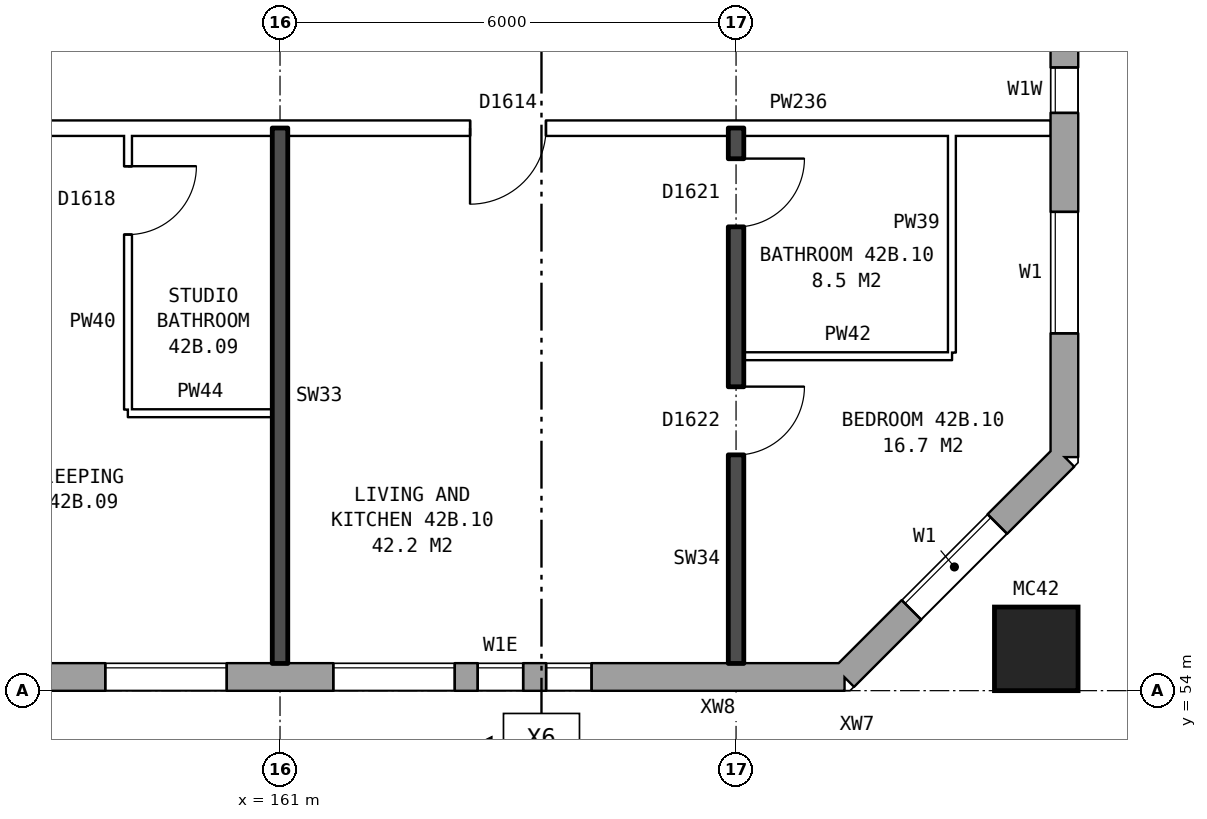
"""IFC4 building model, lengths in metres.
Left out: names, types, materials, properties, quantities, classifications, styles, units other than length and angle.
Written with IfcOpenShell. Run it as: python <this file> out.ifc"""

import sys

from ifc_helpers import new_model, si_unit, direction, frame, frame_2d, origin, origin_2d, place, context, subcontext, project, spatial, rectangle, hollow_rectangle, extrude, element, fill, save


model = new_model("IFC4")
c1 = context("Model", 3, precision=1e-05, world=origin(), true_north=direction((0.0, 1.0)))
c2 = subcontext(c1, "Body", "Model", "MODEL_VIEW")
j1 = project(units=[si_unit("LENGTHUNIT", "METRE"), si_unit("PLANEANGLEUNIT", "RADIAN")], contexts=[c1])
p1 = place(None, origin())
s1 = spatial("IfcSite", under=j1, at=p1, CompositionType="ELEMENT")
p2 = place(p1, origin())
s2 = spatial("IfcBuilding", under=s1, at=p2, CompositionType="ELEMENT")
p3 = place(p2, frame((0.0, 0.0, 151.6)))
s3 = spatial("IfcBuildingStorey", under=s2, at=p3, CompositionType="ELEMENT", Elevation=151.6)
p4 = place(p3, frame((170.95, 54.55, 0.0), z_axis=(0.0, 0.0, 1.0), x_axis=(1.0, 0.0, 0.0)))
e1 = element("IfcColumn", 1, at=p4, inside=s3, PredefinedType="COLUMN", context=c2, shape_type="SweptSolid", body=[
    extrude(hollow_rectangle(XDim=1.1, YDim=1.1, WallThickness=0.06, at=origin_2d()), origin(), (0.0, 0.0, 1.0), 3.1),
])
p5 = place(p3, frame((134.075, 54.18, 0.0), z_axis=(0.0, 0.0, 1.0), x_axis=(1.0, 0.0, 0.0)))
e2 = element("IfcWall", 2, at=p5, inside=s3, PredefinedType="STANDARD", context=c2, shape_type="SweptSolid", body=[
    extrude(rectangle(XDim=34.351, YDim=0.36, at=frame_2d((17.175, 0.0))), origin(), (0.0, 0.0, 1.0), 2.85),
])
p6 = place(p5, frame((0.3, 0.0, 0.8)))
e3 = element("IfcOpeningElement", 3, at=p6, cuts=e2, PredefinedType="OPENING", context=c2, shape_type="SweptSolid", body=[
    extrude(rectangle(XDim=0.8, YDim=1.8, at=frame_2d((0.4, 0.9))), frame((0.0, 0.19, 0.0), z_axis=(0.0, -1.0, 0.0), x_axis=(1.0, 0.0, 0.0)), (0.0, 0.0, 1.0), 0.38),
])
p7 = place(p5, frame((3.575, 0.0, 0.8)))
e4 = element("IfcOpeningElement", 4, at=p7, cuts=e2, PredefinedType="OPENING", context=c2, shape_type="SweptSolid", body=[
    extrude(rectangle(XDim=1.0, YDim=1.2, at=frame_2d((0.5, 0.6))), frame((0.0, 0.19, 0.0), z_axis=(0.0, -1.0, 0.0), x_axis=(1.0, 0.0, 0.0)), (0.0, 0.0, 1.0), 0.38),
])
p8 = place(p5, frame((6.625, 0.0, 0.8)))
e5 = element("IfcOpeningElement", 5, at=p8, cuts=e2, PredefinedType="OPENING", context=c2, shape_type="SweptSolid", body=[
    extrude(rectangle(XDim=1.6, YDim=1.8, at=frame_2d((0.8, 0.9))), frame((0.0, 0.19, 0.0), z_axis=(0.0, -1.0, 0.0), x_axis=(1.0, 0.0, 0.0)), (0.0, 0.0, 1.0), 0.38),
])
p9 = place(p5, frame((9.625, 0.0, 0.8)))
e6 = element("IfcOpeningElement", 6, at=p9, cuts=e2, PredefinedType="OPENING", context=c2, shape_type="SweptSolid", body=[
    extrude(rectangle(XDim=1.6, YDim=1.8, at=frame_2d((0.8, 0.9))), frame((0.0, 0.19, 0.0), z_axis=(0.0, -1.0, 0.0), x_axis=(1.0, 0.0, 0.0)), (0.0, 0.0, 1.0), 0.38),
])
p10 = place(p5, frame((12.625, 0.0, 0.8)))
e7 = element("IfcOpeningElement", 7, at=p10, cuts=e2, PredefinedType="OPENING", context=c2, shape_type="SweptSolid", body=[
    extrude(rectangle(XDim=1.6, YDim=1.8, at=frame_2d((0.8, 0.9))), frame((0.0, 0.19, 0.0), z_axis=(0.0, -1.0, 0.0), x_axis=(1.0, 0.0, 0.0)), (0.0, 0.0, 1.0), 0.38),
])
p11 = place(p5, frame((15.625, 0.0, 0.8)))
e8 = element("IfcOpeningElement", 8, at=p11, cuts=e2, PredefinedType="OPENING", context=c2, shape_type="SweptSolid", body=[
    extrude(rectangle(XDim=1.6, YDim=1.8, at=frame_2d((0.8, 0.9))), frame((0.0, 0.19, 0.0), z_axis=(0.0, -1.0, 0.0), x_axis=(1.0, 0.0, 0.0)), (0.0, 0.0, 1.0), 0.38),
])
p12 = place(p5, frame((18.625, 0.0, 0.8)))
e9 = element("IfcOpeningElement", 9, at=p12, cuts=e2, PredefinedType="OPENING", context=c2, shape_type="SweptSolid", body=[
    extrude(rectangle(XDim=1.6, YDim=1.8, at=frame_2d((0.8, 0.9))), frame((0.0, 0.19, 0.0), z_axis=(0.0, -1.0, 0.0), x_axis=(1.0, 0.0, 0.0)), (0.0, 0.0, 1.0), 0.38),
])
p13 = place(p5, frame((21.625, 0.0, 0.8)))
e10 = element("IfcOpeningElement", 10, at=p13, cuts=e2, PredefinedType="OPENING", context=c2, shape_type="SweptSolid", body=[
    extrude(rectangle(XDim=1.6, YDim=1.8, at=frame_2d((0.8, 0.9))), frame((0.0, 0.19, 0.0), z_axis=(0.0, -1.0, 0.0), x_axis=(1.0, 0.0, 0.0)), (0.0, 0.0, 1.0), 0.38),
])
p14 = place(p5, frame((24.625, 0.0, 0.8)))
e11 = element("IfcOpeningElement", 11, at=p14, cuts=e2, PredefinedType="OPENING", context=c2, shape_type="SweptSolid", body=[
    extrude(rectangle(XDim=1.6, YDim=1.8, at=frame_2d((0.8, 0.9))), frame((0.0, 0.19, 0.0), z_axis=(0.0, -1.0, 0.0), x_axis=(1.0, 0.0, 0.0)), (0.0, 0.0, 1.0), 0.38),
])
p15 = place(p5, frame((27.625, 0.0, 0.8)))
e12 = element("IfcOpeningElement", 12, at=p15, cuts=e2, PredefinedType="OPENING", context=c2, shape_type="SweptSolid", body=[
    extrude(rectangle(XDim=1.6, YDim=1.8, at=frame_2d((0.8, 0.9))), frame((0.0, 0.19, 0.0), z_axis=(0.0, -1.0, 0.0), x_axis=(1.0, 0.0, 0.0)), (0.0, 0.0, 1.0), 0.38),
])
p16 = place(p5, frame((29.525, 0.0, 0.8)))
e13 = element("IfcOpeningElement", 13, at=p16, cuts=e2, PredefinedType="OPENING", context=c2, shape_type="SweptSolid", body=[
    extrude(rectangle(XDim=0.6, YDim=1.8, at=frame_2d((0.3, 0.9))), frame((0.0, 0.19, 0.0), z_axis=(0.0, -1.0, 0.0), x_axis=(1.0, 0.0, 0.0)), (0.0, 0.0, 1.0), 0.38),
])
p17 = place(p5, frame((1.4, 0.0, 1.6)))
e14 = element("IfcOpeningElement", 14, at=p17, cuts=e2, PredefinedType="OPENING", context=c2, shape_type="SweptSolid", body=[
    extrude(rectangle(XDim=0.6, YDim=0.9, at=frame_2d((0.3, 0.45))), frame((0.0, 0.19, 0.0), z_axis=(0.0, -1.0, 0.0), x_axis=(1.0, 0.0, 0.0)), (0.0, 0.0, 1.0), 0.38),
])
p18 = place(p5, frame((4.875, 0.0, 0.8)))
e15 = element("IfcOpeningElement", 15, at=p18, cuts=e2, PredefinedType="OPENING", context=c2, shape_type="SweptSolid", body=[
    extrude(rectangle(XDim=1.4, YDim=1.8, at=frame_2d((0.7, 0.9))), frame((0.0, 0.19, 0.0), z_axis=(0.0, -1.0, 0.0), x_axis=(1.0, 0.0, 0.0)), (0.0, 0.0, 1.0), 0.38),
])
p19 = place(p5, frame((30.425, 0.0, 0.8)))
e16 = element("IfcOpeningElement", 16, at=p19, cuts=e2, PredefinedType="OPENING", context=c2, shape_type="SweptSolid", body=[
    extrude(rectangle(XDim=0.6, YDim=0.9, at=frame_2d((0.3, 0.45))), frame((0.0, 0.19, 0.0), z_axis=(0.0, -1.0, 0.0), x_axis=(1.0, 0.0, 0.0)), (0.0, 0.0, 1.0), 0.38),
])
p20 = place(p3, frame((168.425, 54.18, 0.0), z_axis=(0.0, 0.0, 1.0), x_axis=(0.707106781187, 0.707106781187, 0.0)))
e17 = element("IfcWall", 17, at=p20, inside=s3, PredefinedType="STANDARD", context=c2, shape_type="SweptSolid", body=[
    extrude(rectangle(XDim=4.094, YDim=0.36, at=frame_2d((2.047, 0.0))), origin(), (0.0, 0.0, 1.0), 2.85),
])
p21 = place(p20, frame((1.247, 0.0, 0.8)))
e18 = element("IfcOpeningElement", 18, at=p21, cuts=e17, PredefinedType="OPENING", context=c2, shape_type="SweptSolid", body=[
    extrude(rectangle(XDim=1.6, YDim=1.8, at=frame_2d((0.8, 0.9))), frame((0.0, 0.19, 0.0), z_axis=(0.0, -1.0, 0.0), x_axis=(1.0, 0.0, 0.0)), (0.0, 0.0, 1.0), 0.38),
])
p22 = place(p3, frame((171.32, 57.075, 0.0), z_axis=(0.0, 0.0, 1.0), x_axis=(0.0, 1.0, 0.0)))
e19 = element("IfcWall", 19, at=p22, inside=s3, PredefinedType="STANDARD", context=c2, shape_type="SweptSolid", body=[
    extrude(rectangle(XDim=25.851, YDim=0.36, at=frame_2d((12.925, 0.0))), origin(), (0.0, 0.0, 1.0), 2.85),
])
p23 = place(p22, frame((1.625, 0.0, 0.8)))
e20 = element("IfcOpeningElement", 20, at=p23, cuts=e19, PredefinedType="OPENING", context=c2, shape_type="SweptSolid", body=[
    extrude(rectangle(XDim=1.6, YDim=1.8, at=frame_2d((0.8, 0.9))), frame((0.0, 0.19, 0.0), z_axis=(0.0, -1.0, 0.0), x_axis=(1.0, 0.0, 0.0)), (0.0, 0.0, 1.0), 0.38),
])
p24 = place(p22, frame((4.525, 0.0, 1.7)))
e21 = element("IfcOpeningElement", 21, at=p24, cuts=e19, PredefinedType="OPENING", context=c2, shape_type="SweptSolid", body=[
    extrude(rectangle(XDim=0.6, YDim=0.9, at=frame_2d((0.3, 0.45))), frame((0.0, 0.19, 0.0), z_axis=(0.0, -1.0, 0.0), x_axis=(1.0, 0.0, 0.0)), (0.0, 0.0, 1.0), 0.38),
])
p25 = place(p22, frame((7.625, 0.0, 0.8)))
e22 = element("IfcOpeningElement", 22, at=p25, cuts=e19, PredefinedType="OPENING", context=c2, shape_type="SweptSolid", body=[
    extrude(rectangle(XDim=1.6, YDim=1.8, at=frame_2d((0.8, 0.9))), frame((0.0, 0.19, 0.0), z_axis=(0.0, -1.0, 0.0), x_axis=(1.0, 0.0, 0.0)), (0.0, 0.0, 1.0), 0.38),
])
p26 = place(p22, frame((10.625, 0.0, 0.8)))
e23 = element("IfcOpeningElement", 23, at=p26, cuts=e19, PredefinedType="OPENING", context=c2, shape_type="SweptSolid", body=[
    extrude(rectangle(XDim=1.6, YDim=1.8, at=frame_2d((0.8, 0.9))), frame((0.0, 0.19, 0.0), z_axis=(0.0, -1.0, 0.0), x_axis=(1.0, 0.0, 0.0)), (0.0, 0.0, 1.0), 0.38),
])
p27 = place(p22, frame((13.625, 0.0, 0.8)))
e24 = element("IfcOpeningElement", 24, at=p27, cuts=e19, PredefinedType="OPENING", context=c2, shape_type="SweptSolid", body=[
    extrude(rectangle(XDim=1.6, YDim=1.8, at=frame_2d((0.8, 0.9))), frame((0.0, 0.19, 0.0), z_axis=(0.0, -1.0, 0.0), x_axis=(1.0, 0.0, 0.0)), (0.0, 0.0, 1.0), 0.38),
])
p28 = place(p22, frame((16.625, 0.0, 0.8)))
e25 = element("IfcOpeningElement", 25, at=p28, cuts=e19, PredefinedType="OPENING", context=c2, shape_type="SweptSolid", body=[
    extrude(rectangle(XDim=1.6, YDim=1.8, at=frame_2d((0.8, 0.9))), frame((0.0, 0.19, 0.0), z_axis=(0.0, -1.0, 0.0), x_axis=(1.0, 0.0, 0.0)), (0.0, 0.0, 1.0), 0.38),
])
p29 = place(p22, frame((6.125, 0.0, 0.8)))
e26 = element("IfcOpeningElement", 26, at=p29, cuts=e19, PredefinedType="OPENING", context=c2, shape_type="SweptSolid", body=[
    extrude(rectangle(XDim=1.2, YDim=0.9, at=frame_2d((0.6, 0.45))), frame((0.0, 0.19, 0.0), z_axis=(0.0, -1.0, 0.0), x_axis=(1.0, 0.0, 0.0)), (0.0, 0.0, 1.0), 0.38),
])
p30 = place(p22, frame((22.625, 0.0, 0.8)))
e27 = element("IfcOpeningElement", 27, at=p30, cuts=e19, PredefinedType="OPENING", context=c2, shape_type="SweptSolid", body=[
    extrude(rectangle(XDim=1.6, YDim=1.8, at=frame_2d((0.8, 0.9))), frame((0.0, 0.19, 0.0), z_axis=(0.0, -1.0, 0.0), x_axis=(1.0, 0.0, 0.0)), (0.0, 0.0, 1.0), 0.38),
])
p31 = place(p22, frame((9.525, 0.0, 0.8)))
e28 = element("IfcOpeningElement", 28, at=p31, cuts=e19, PredefinedType="OPENING", context=c2, shape_type="SweptSolid", body=[
    extrude(rectangle(XDim=0.8, YDim=1.8, at=frame_2d((0.4, 0.9))), frame((0.0, 0.19, 0.0), z_axis=(0.0, -1.0, 0.0), x_axis=(1.0, 0.0, 0.0)), (0.0, 0.0, 1.0), 0.38),
])
p32 = place(p22, frame((12.525, 0.0, 0.8)))
e29 = element("IfcOpeningElement", 29, at=p32, cuts=e19, PredefinedType="OPENING", context=c2, shape_type="SweptSolid", body=[
    extrude(rectangle(XDim=0.8, YDim=1.8, at=frame_2d((0.4, 0.9))), frame((0.0, 0.19, 0.0), z_axis=(0.0, -1.0, 0.0), x_axis=(1.0, 0.0, 0.0)), (0.0, 0.0, 1.0), 0.38),
])
p33 = place(p22, frame((15.525, 0.0, 0.8)))
e30 = element("IfcOpeningElement", 30, at=p33, cuts=e19, PredefinedType="OPENING", context=c2, shape_type="SweptSolid", body=[
    extrude(rectangle(XDim=0.8, YDim=1.8, at=frame_2d((0.4, 0.9))), frame((0.0, 0.19, 0.0), z_axis=(0.0, -1.0, 0.0), x_axis=(1.0, 0.0, 0.0)), (0.0, 0.0, 1.0), 0.38),
])
p34 = place(p22, frame((18.525, 0.0, 0.8)))
e31 = element("IfcOpeningElement", 31, at=p34, cuts=e19, PredefinedType="OPENING", context=c2, shape_type="SweptSolid", body=[
    extrude(rectangle(XDim=1.0, YDim=0.9, at=frame_2d((0.5, 0.45))), frame((0.0, 0.19, 0.0), z_axis=(0.0, -1.0, 0.0), x_axis=(1.0, 0.0, 0.0)), (0.0, 0.0, 1.0), 0.38),
])
p35 = place(p22, frame((20.725, 0.0, 1.7)))
e32 = element("IfcOpeningElement", 32, at=p35, cuts=e19, PredefinedType="OPENING", context=c2, shape_type="SweptSolid", body=[
    extrude(rectangle(XDim=0.6, YDim=0.9, at=frame_2d((0.3, 0.45))), frame((0.0, 0.19, 0.0), z_axis=(0.0, -1.0, 0.0), x_axis=(1.0, 0.0, 0.0)), (0.0, 0.0, 1.0), 0.38),
])
p36 = place(p3, frame((159.0, 57.65, 0.0), z_axis=(0.0, 0.0, 1.0), x_axis=(1.0, 0.0, 0.0)))
e33 = element("IfcWall", 33, at=p36, inside=s3, PredefinedType="PARTITIONING", context=c2, shape_type="SweptSolid", body=[
    extrude(rectangle(XDim=1.9, YDim=0.1, at=frame_2d((0.95, 0.0))), origin(), (0.0, 0.0, 1.0), 2.85),
])
p37 = place(p3, frame((167.1, 58.4, 0.0), z_axis=(0.0, 0.0, 1.0), x_axis=(1.0, 0.0, 0.0)))
e34 = element("IfcWall", 34, at=p37, inside=s3, PredefinedType="PARTITIONING", context=c2, shape_type="SweptSolid", body=[
    extrude(rectangle(XDim=2.74, YDim=0.1, at=frame_2d((1.37, 0.0))), origin(), (0.0, 0.0, 1.0), 2.85),
])
p38 = place(p3, frame((155.1, 61.4, 0.0), z_axis=(0.0, 0.0, 1.0), x_axis=(1.0, 0.0, 0.0)))
e35 = element("IfcWall", 35, at=p38, inside=s3, PredefinedType="PARTITIONING", context=c2, shape_type="SweptSolid", body=[
    extrude(rectangle(XDim=16.04, YDim=0.2, at=frame_2d((8.02, 0.0))), origin(), (0.0, 0.0, 1.0), 2.85),
])
p39 = place(p38, frame((1.45, 0.0, 0.0)))
e36 = element("IfcOpeningElement", 36, at=p39, cuts=e35, PredefinedType="OPENING", context=c2, shape_type="SweptSolid", body=[
    extrude(rectangle(XDim=1.0, YDim=2.1, at=frame_2d((0.5, 1.05))), frame((0.0, 0.11, 0.0), z_axis=(0.0, -1.0, 0.0), x_axis=(1.0, 0.0, 0.0)), (0.0, 0.0, 1.0), 0.22),
])
p40 = place(p38, frame((8.4, 0.0, 0.0)))
e37 = element("IfcOpeningElement", 37, at=p40, cuts=e35, PredefinedType="OPENING", context=c2, shape_type="SweptSolid", body=[
    extrude(rectangle(XDim=1.0, YDim=2.1, at=frame_2d((0.5, 1.05))), frame((0.0, 0.11, 0.0), z_axis=(0.0, -1.0, 0.0), x_axis=(1.0, 0.0, 0.0)), (0.0, 0.0, 1.0), 0.22),
])
p41 = place(p3, frame((159.0, 57.7, 0.0), z_axis=(0.0, 0.0, 1.0), x_axis=(0.0, 1.0, 0.0)))
e38 = element("IfcWall", 38, at=p41, inside=s3, PredefinedType="PARTITIONING", context=c2, shape_type="SweptSolid", body=[
    extrude(rectangle(XDim=3.6, YDim=0.1, at=frame_2d((1.8, 0.0))), origin(), (0.0, 0.0, 1.0), 2.85),
])
p42 = place(p41, frame((2.3, 0.0, 0.0)))
e39 = element("IfcOpeningElement", 39, at=p42, cuts=e38, PredefinedType="OPENING", context=c2, shape_type="SweptSolid", body=[
    extrude(rectangle(XDim=0.9, YDim=2.1, at=frame_2d((0.45, 1.05))), frame((0.0, 0.06, 0.0), z_axis=(0.0, -1.0, 0.0), x_axis=(1.0, 0.0, 0.0)), (0.0, 0.0, 1.0), 0.12),
])
p43 = place(p3, frame((161.0, 54.36, 0.0), z_axis=(0.0, 0.0, 1.0), x_axis=(0.0, 1.0, 0.0)))
e40 = element("IfcWall", 40, at=p43, inside=s3, PredefinedType="SOLIDWALL", context=c2, shape_type="SweptSolid", body=[
    extrude(rectangle(XDim=7.04, YDim=0.2, at=frame_2d((3.52, 0.0))), origin(), (0.0, 0.0, 1.0), 2.85),
])
p44 = place(p3, frame((167.0, 54.36, 0.0), z_axis=(0.0, 0.0, 1.0), x_axis=(0.0, 1.0, 0.0)))
e41 = element("IfcWall", 41, at=p44, inside=s3, PredefinedType="SOLIDWALL", context=c2, shape_type="SweptSolid", body=[
    extrude(rectangle(XDim=7.04, YDim=0.2, at=frame_2d((3.52, 0.0))), origin(), (0.0, 0.0, 1.0), 2.85),
])
p45 = place(p44, frame((2.74, 0.0, 0.0)))
e42 = element("IfcOpeningElement", 42, at=p45, cuts=e41, PredefinedType="OPENING", context=c2, shape_type="SweptSolid", body=[
    extrude(rectangle(XDim=0.9, YDim=2.1, at=frame_2d((0.45, 1.05))), frame((0.0, 0.11, 0.0), z_axis=(0.0, -1.0, 0.0), x_axis=(1.0, 0.0, 0.0)), (0.0, 0.0, 1.0), 0.22),
])
p46 = place(p44, frame((5.74, 0.0, 0.0)))
e43 = element("IfcOpeningElement", 43, at=p46, cuts=e41, PredefinedType="OPENING", context=c2, shape_type="SweptSolid", body=[
    extrude(rectangle(XDim=0.9, YDim=2.1, at=frame_2d((0.45, 1.05))), frame((0.0, 0.11, 0.0), z_axis=(0.0, -1.0, 0.0), x_axis=(1.0, 0.0, 0.0)), (0.0, 0.0, 1.0), 0.22),
])
p47 = place(p3, frame((169.84, 58.45, 0.0), z_axis=(0.0, 0.0, 1.0), x_axis=(0.0, 1.0, 0.0)))
e44 = element("IfcWall", 44, at=p47, inside=s3, PredefinedType="PARTITIONING", context=c2, shape_type="SweptSolid", body=[
    extrude(rectangle(XDim=2.85, YDim=0.1, at=frame_2d((1.425, 0.0))), origin(), (0.0, 0.0, 1.0), 2.85),
])
p48 = place(p14, origin())
e45 = element("IfcWindow", 45, at=p48, inside=s3, PartitioningType="SINGLE_PANEL", PredefinedType="WINDOW", context=c2, shape_type="SweptSolid", body=[
    extrude(rectangle(XDim=1.6, YDim=1.8, at=frame_2d((0.8, 0.9))), frame((0.0, 0.15, 0.0), z_axis=(0.0, -1.0, 0.0), x_axis=(1.0, 0.0, 0.0)), (0.0, 0.0, 1.0), 0.06),
])
fill(e11, e45)
p49 = place(p15, origin())
e46 = element("IfcWindow", 46, at=p49, inside=s3, PartitioningType="SINGLE_PANEL", PredefinedType="WINDOW", context=c2, shape_type="SweptSolid", body=[
    extrude(rectangle(XDim=1.6, YDim=1.8, at=frame_2d((0.8, 0.9))), frame((0.0, 0.15, 0.0), z_axis=(0.0, -1.0, 0.0), x_axis=(1.0, 0.0, 0.0)), (0.0, 0.0, 1.0), 0.06),
])
fill(e12, e46)
p50 = place(p16, origin())
e47 = element("IfcWindow", 47, at=p50, inside=s3, PartitioningType="SINGLE_PANEL", PredefinedType="WINDOW", context=c2, shape_type="SweptSolid", body=[
    extrude(rectangle(XDim=0.6, YDim=1.8, at=frame_2d((0.3, 0.9))), frame((0.0, 0.15, 0.0), z_axis=(0.0, -1.0, 0.0), x_axis=(1.0, 0.0, 0.0)), (0.0, 0.0, 1.0), 0.06),
])
fill(e13, e47)
p51 = place(p21, origin())
e48 = element("IfcWindow", 48, at=p51, inside=s3, PartitioningType="SINGLE_PANEL", PredefinedType="WINDOW", context=c2, shape_type="SweptSolid", body=[
    extrude(rectangle(XDim=1.6, YDim=1.8, at=frame_2d((0.8, 0.9))), frame((0.0, 0.15, 0.0), z_axis=(0.0, -1.0, 0.0), x_axis=(1.0, 0.0, 0.0)), (0.0, 0.0, 1.0), 0.06),
])
fill(e18, e48)
p52 = place(p23, origin())
e49 = element("IfcWindow", 49, at=p52, inside=s3, PartitioningType="SINGLE_PANEL", PredefinedType="WINDOW", context=c2, shape_type="SweptSolid", body=[
    extrude(rectangle(XDim=1.6, YDim=1.8, at=frame_2d((0.8, 0.9))), frame((0.0, 0.15, 0.0), z_axis=(0.0, -1.0, 0.0), x_axis=(1.0, 0.0, 0.0)), (0.0, 0.0, 1.0), 0.06),
])
fill(e20, e49)
p53 = place(p24, origin())
e50 = element("IfcWindow", 50, at=p53, inside=s3, PartitioningType="SINGLE_PANEL", PredefinedType="WINDOW", context=c2, shape_type="SweptSolid", body=[
    extrude(rectangle(XDim=0.6, YDim=0.9, at=frame_2d((0.3, 0.45))), frame((0.0, 0.15, 0.0), z_axis=(0.0, -1.0, 0.0), x_axis=(1.0, 0.0, 0.0)), (0.0, 0.0, 1.0), 0.06),
])
fill(e21, e50)
p54 = place(p42, frame((0.9, 0.0, 0.0), z_axis=(0.0, 0.0, 1.0), x_axis=(-1.0, 0.0, 0.0)))
e51 = element("IfcDoor", 51, at=p54, inside=s3, OperationType="SINGLE_SWING_LEFT", PredefinedType="DOOR", context=c2, shape_type="SweptSolid", body=[
    extrude(rectangle(XDim=0.9, YDim=2.1, at=frame_2d((0.45, 1.05))), frame((0.0, 0.025, 0.0), z_axis=(0.0, -1.0, 0.0), x_axis=(1.0, 0.0, 0.0)), (0.0, 0.0, 1.0), 0.05),
])
fill(e39, e51)
p55 = place(p45, frame((0.9, 0.0, 0.0), z_axis=(0.0, 0.0, 1.0), x_axis=(-1.0, 0.0, 0.0)))
e52 = element("IfcDoor", 52, at=p55, inside=s3, OperationType="SINGLE_SWING_LEFT", PredefinedType="DOOR", context=c2, shape_type="SweptSolid", body=[
    extrude(rectangle(XDim=0.9, YDim=2.1, at=frame_2d((0.45, 1.05))), frame((0.0, 0.025, 0.0), z_axis=(0.0, -1.0, 0.0), x_axis=(1.0, 0.0, 0.0)), (0.0, 0.0, 1.0), 0.05),
])
fill(e42, e52)
p56 = place(p40, frame((1.0, 0.0, 0.0), z_axis=(0.0, 0.0, 1.0), x_axis=(-1.0, 0.0, 0.0)))
e53 = element("IfcDoor", 53, at=p56, inside=s3, OperationType="SINGLE_SWING_RIGHT", PredefinedType="DOOR", context=c2, shape_type="SweptSolid", body=[
    extrude(rectangle(XDim=1.0, YDim=2.1, at=frame_2d((0.5, 1.05))), frame((0.0, 0.025, 0.0), z_axis=(0.0, -1.0, 0.0), x_axis=(1.0, 0.0, 0.0)), (0.0, 0.0, 1.0), 0.05),
])
fill(e37, e53)
p57 = place(p46, frame((0.9, 0.0, 0.0), z_axis=(0.0, 0.0, 1.0), x_axis=(-1.0, 0.0, 0.0)))
e54 = element("IfcDoor", 54, at=p57, inside=s3, OperationType="SINGLE_SWING_LEFT", PredefinedType="DOOR", context=c2, shape_type="SweptSolid", body=[
    extrude(rectangle(XDim=0.9, YDim=2.1, at=frame_2d((0.45, 1.05))), frame((0.0, 0.025, 0.0), z_axis=(0.0, -1.0, 0.0), x_axis=(1.0, 0.0, 0.0)), (0.0, 0.0, 1.0), 0.05),
])
fill(e43, e54)
p58 = place(p19, origin())
e55 = element("IfcWindow", 55, at=p58, inside=s3, PartitioningType="SINGLE_PANEL", PredefinedType="WINDOW", context=c2, shape_type="SweptSolid", body=[
    extrude(rectangle(XDim=0.6, YDim=0.9, at=frame_2d((0.3, 0.45))), frame((0.0, 0.15, 0.0), z_axis=(0.0, -1.0, 0.0), x_axis=(1.0, 0.0, 0.0)), (0.0, 0.0, 1.0), 0.06),
])
fill(e16, e55)
save(model, sys.argv[1])
